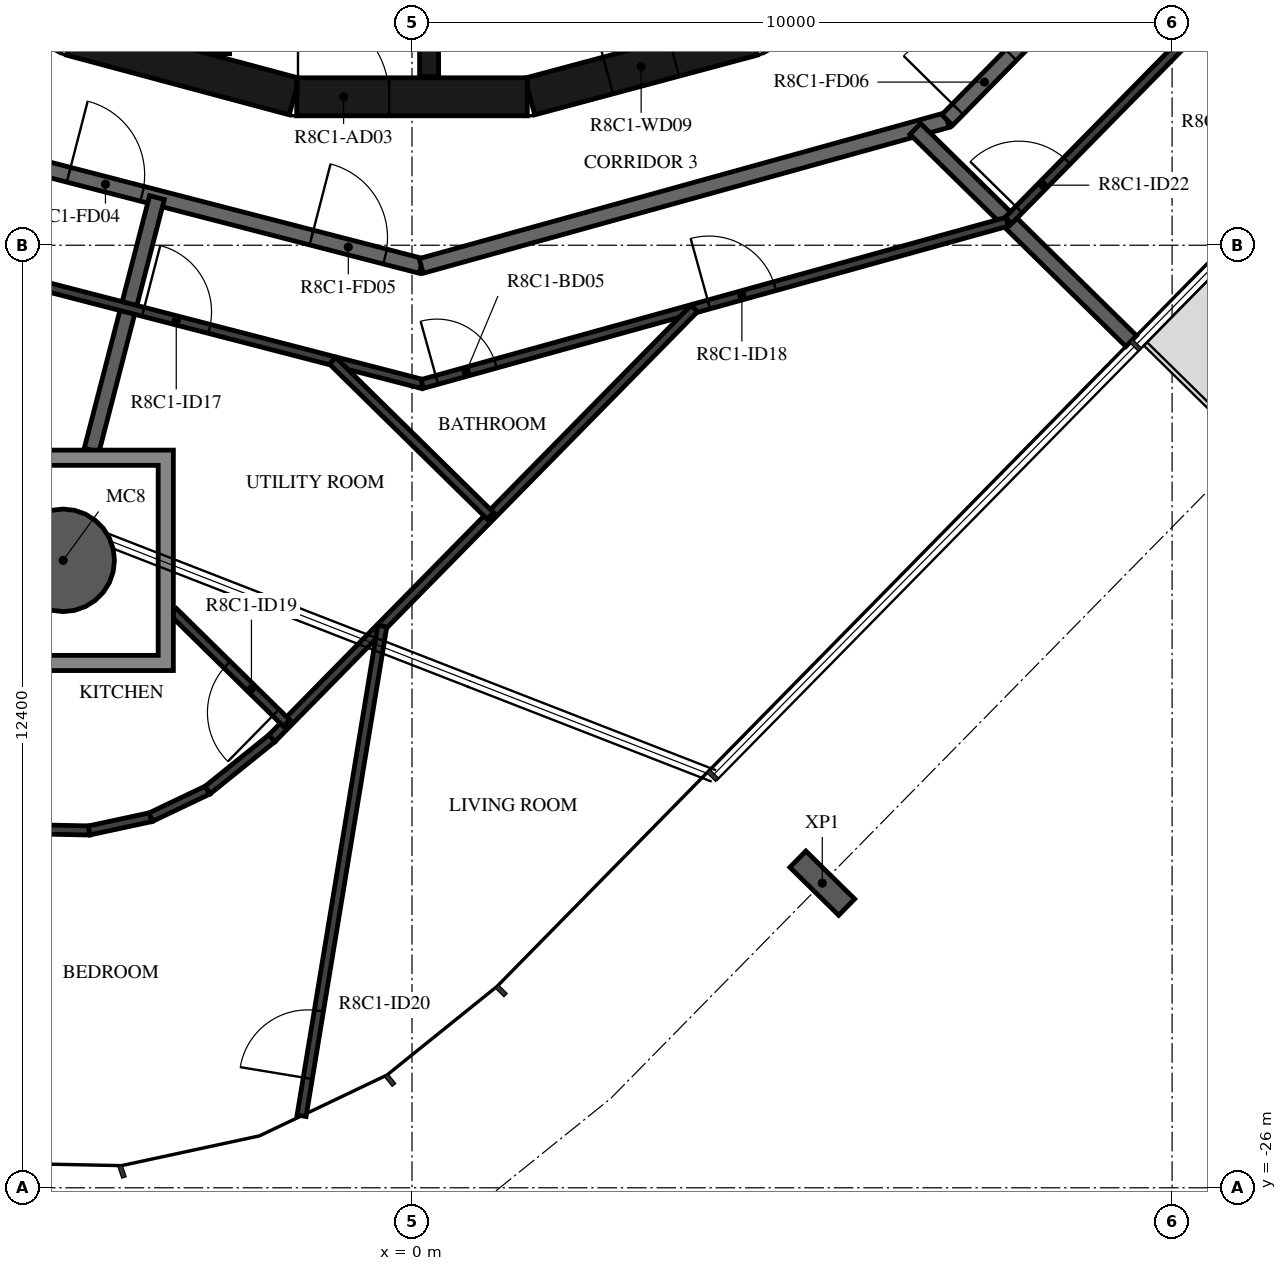
"""IFC4 building model, lengths in metres.
Left out: names, types, materials, properties, quantities, classifications, styles, units other than length and angle.
Written with IfcOpenShell. Run it as: python <this file> out.ifc"""

import sys

from ifc_helpers import new_model, si_unit, direction, frame, frame_2d, origin, origin_2d, place, context, subcontext, project, spatial, polyline, rectangle, hollow_circle, i_section, outline, extrude, element, fill, save


model = new_model("IFC4")
c1 = context("Model", 3, precision=1e-05, world=origin(), true_north=direction((0.0, 1.0)))
c2 = subcontext(c1, "Body", "Model", "MODEL_VIEW")
j1 = project(units=[si_unit("LENGTHUNIT", "METRE"), si_unit("PLANEANGLEUNIT", "RADIAN")], contexts=[c1])
p1 = place(None, origin())
s1 = spatial("IfcSite", under=j1, at=p1, CompositionType="ELEMENT")
p2 = place(p1, origin())
s2 = spatial("IfcBuilding", under=s1, at=p2, CompositionType="ELEMENT")
p3 = place(p2, frame((0.0, 0.0, 322.7)))
s3 = spatial("IfcBuildingStorey", under=s2, at=p3, CompositionType="ELEMENT", Elevation=322.7)
p4 = place(p3, frame((-4.589, -17.745, -0.38), z_axis=(0.0, 0.0, 1.0), x_axis=(1.0, 0.0, 0.0)))
e1 = element("IfcColumn", 1, at=p4, inside=s3, PredefinedType="COLUMN", context=c2, shape_type="SweptSolid", body=[
    extrude(hollow_circle(Radius=0.675, WallThickness=0.03, at=origin_2d()), origin(), (0.0, 0.0, 1.0), 2.616),
])
p5 = place(p3, frame((5.398, -21.992, -0.38), z_axis=(0.0, 0.0, 1.0), x_axis=(-0.70090935439, -0.713250360623, 0.0)))
e2 = element("IfcColumn", 2, at=p5, inside=s3, PredefinedType="COLUMN", context=c2, shape_type="SweptSolid", body=[
    extrude(i_section(OverallWidth=0.3, OverallDepth=0.9, WebThickness=0.019, FlangeThickness=0.035, FilletRadius=0.03, at=origin_2d()), origin(), (0.0, 0.0, 1.0), 2.616),
])
p6 = place(p3, frame((1.55, -11.643, 0.0), z_axis=(0.0, 0.0, 1.0), x_axis=(0.965948410781, 0.258734743916, 0.0)))
e3 = element("IfcWall", 3, at=p6, inside=s3, PredefinedType="SHEAR", context=c2, shape_type="SweptSolid", body=[
    extrude(rectangle(XDim=3.033, YDim=0.5, at=frame_2d((1.516, 0.0))), origin(), (0.0, 0.0, 1.0), 3.05),
])
p7 = place(p6, frame((1.066, 0.0, 0.0)))
e4 = element("IfcOpeningElement", 4, at=p7, cuts=e3, PredefinedType="OPENING", context=c2, shape_type="SweptSolid", body=[
    extrude(rectangle(XDim=0.9, YDim=2.1, at=frame_2d((0.45, 1.05))), frame((0.0, 0.26, 0.0), z_axis=(0.0, -1.0, 0.0), x_axis=(1.0, 0.0, 0.0)), (0.0, 0.0, 1.0), 0.52),
])
p8 = place(p3, frame((-4.479, -10.858, 0.0), z_axis=(0.0, 0.0, 1.0), x_axis=(0.965948410781, -0.258734743916, 0.0)))
e5 = element("IfcWall", 5, at=p8, inside=s3, PredefinedType="SHEAR", context=c2, shape_type="SweptSolid", body=[
    extrude(rectangle(XDim=3.033, YDim=0.5, at=frame_2d((1.516, 0.0))), origin(), (0.0, 0.0, 1.0), 3.05),
])
p9 = place(p3, frame((-1.516, -11.647, 0.0), z_axis=(0.0, 0.0, 1.0), x_axis=(1.0, 0.0, 0.0)))
e6 = element("IfcWall", 6, at=p9, inside=s3, PredefinedType="SHEAR", context=c2, shape_type="SweptSolid", body=[
    extrude(rectangle(XDim=3.033, YDim=0.5, at=frame_2d((1.516, 0.0))), origin(), (0.0, 0.0, 1.0), 3.05),
])
p10 = place(p9, frame((0.016, 0.0, 0.0)))
e7 = element("IfcOpeningElement", 7, at=p10, cuts=e6, PredefinedType="OPENING", context=c2, shape_type="SweptSolid", body=[
    extrude(rectangle(XDim=1.2, YDim=2.1, at=frame_2d((0.6, 1.05))), frame((0.0, 0.26, 0.0), z_axis=(0.0, -1.0, 0.0), x_axis=(1.0, 0.0, 0.0)), (0.0, 0.0, 1.0), 0.52),
])
p11 = place(p3, frame((-2.525, -8.97, 0.0), z_axis=(0.0, 0.0, 1.0), x_axis=(0.0, -1.0, 0.0)))
e8 = element("IfcWall", 8, at=p11, inside=s3, PredefinedType="SHEAR", context=c2, shape_type="SweptSolid", body=[
    extrude(rectangle(XDim=2.11, YDim=0.25, at=frame_2d((1.055, 0.0))), origin(), (0.0, 0.0, 1.0), 3.05),
])
p12 = place(p3, frame((0.225, -8.97, 0.0), z_axis=(0.0, 0.0, 1.0), x_axis=(0.0, -1.0, 0.0)))
e9 = element("IfcWall", 9, at=p12, inside=s3, PredefinedType="SHEAR", context=c2, shape_type="SweptSolid", body=[
    extrude(rectangle(XDim=2.41, YDim=0.25, at=frame_2d((1.205, 0.0))), origin(), (0.0, 0.0, 1.0), 3.05),
])
p13 = place(p3, frame((-6.831, -12.074, 0.0), z_axis=(0.0, 0.0, 1.0), x_axis=(0.968144780225, -0.250391063186, 0.0)))
e10 = element("IfcWall", 10, at=p13, inside=s3, PredefinedType="STANDARD", context=c2, shape_type="SweptSolid", body=[
    extrude(rectangle(XDim=7.181, YDim=0.2, at=frame_2d((3.591, 0.0))), origin(), (0.0, 0.0, 1.0), 3.05),
])
p14 = place(p13, frame((2.39, 0.0, 0.0)))
e11 = element("IfcOpeningElement", 11, at=p14, cuts=e10, PredefinedType="OPENING", context=c2, shape_type="SweptSolid", body=[
    extrude(rectangle(XDim=1.0, YDim=2.1, at=frame_2d((0.5, 1.05))), frame((0.0, 0.11, 0.0), z_axis=(0.0, -1.0, 0.0), x_axis=(1.0, 0.0, 0.0)), (0.0, 0.0, 1.0), 0.22),
])
p15 = place(p13, frame((5.69, 0.0, 0.0)))
e12 = element("IfcOpeningElement", 12, at=p15, cuts=e10, PredefinedType="OPENING", context=c2, shape_type="SweptSolid", body=[
    extrude(rectangle(XDim=1.0, YDim=2.1, at=frame_2d((0.5, 1.05))), frame((0.0, 0.11, 0.0), z_axis=(0.0, -1.0, 0.0), x_axis=(1.0, 0.0, 0.0)), (0.0, 0.0, 1.0), 0.22),
])
p16 = place(p3, frame((0.121, -13.872, 0.0), z_axis=(0.0, 0.0, 1.0), x_axis=(0.963625960674, 0.267254575108, 0.0)))
e13 = element("IfcWall", 13, at=p16, inside=s3, PredefinedType="STANDARD", context=c2, shape_type="SweptSolid", body=[
    extrude(rectangle(XDim=7.181, YDim=0.2, at=frame_2d((3.591, 0.0))), origin(), (0.0, 0.0, 1.0), 3.05),
])
p17 = place(p3, frame((7.041, -11.953, 0.0), z_axis=(0.0, 0.0, 1.0), x_axis=(0.70090916255, 0.713250549143, 0.0)))
e14 = element("IfcWall", 14, at=p17, inside=s3, PredefinedType="STANDARD", context=c2, shape_type="SweptSolid", body=[
    extrude(rectangle(XDim=7.181, YDim=0.2, at=frame_2d((3.59, 0.0))), origin(), (0.0, 0.0, 1.0), 3.05),
])
p18 = place(p17, frame((0.2, 0.0, 0.0)))
e15 = element("IfcOpeningElement", 15, at=p18, cuts=e14, PredefinedType="OPENING", context=c2, shape_type="SweptSolid", body=[
    extrude(rectangle(XDim=1.0, YDim=2.1, at=frame_2d((0.5, 1.05))), frame((0.0, 0.11, 0.0), z_axis=(0.0, -1.0, 0.0), x_axis=(1.0, 0.0, 0.0)), (0.0, 0.0, 1.0), 0.22),
])
p19 = place(p3, frame((-4.214, -16.295, 0.0), z_axis=(0.0, 0.0, 1.0), x_axis=(0.250428810918, 0.968135016752, 0.0)))
e16 = element("IfcWall", 16, at=p19, inside=s3, PredefinedType="STANDARD", context=c2, shape_type="SweptSolid", body=[
    extrude(rectangle(XDim=3.432, YDim=0.2, at=frame_2d((1.716, 0.0))), origin(), (0.0, 0.0, 1.0), 3.05),
])
p20 = place(p3, frame((9.462, -14.861, 0.0), z_axis=(0.0, 0.0, 1.0), x_axis=(-0.713302018318, 0.700856783276, 0.0)))
e17 = element("IfcWall", 17, at=p20, inside=s3, PredefinedType="STANDARD", context=c2, shape_type="SweptSolid", body=[
    extrude(rectangle(XDim=3.982, YDim=0.2, at=frame_2d((1.991, 0.0))), origin(), (0.0, 0.0, 1.0), 3.05),
])
p21 = place(p3, frame((-7.05, -13.567, 0.0), z_axis=(0.0, 0.0, 1.0), x_axis=(0.968142373865, -0.250400367264, 0.0)))
e18 = element("IfcWall", 18, at=p21, inside=s3, PredefinedType="PARTITIONING", context=c2, shape_type="SweptSolid", body=[
    extrude(rectangle(XDim=7.421, YDim=0.12, at=frame_2d((3.71, 0.0))), origin(), (0.0, 0.0, 1.0), 3.05),
])
p22 = place(p21, frame((3.628, 0.0, 0.0)))
e19 = element("IfcOpeningElement", 19, at=p22, cuts=e18, PredefinedType="OPENING", context=c2, shape_type="SweptSolid", body=[
    extrude(rectangle(XDim=0.9, YDim=2.1, at=frame_2d((0.45, 1.05))), frame((0.0, 0.07, 0.0), z_axis=(0.0, -1.0, 0.0), x_axis=(1.0, 0.0, 0.0)), (0.0, 0.0, 1.0), 0.14),
])
p23 = place(p3, frame((0.135, -15.425, 0.0), z_axis=(0.0, 0.0, 1.0), x_axis=(0.963633899075, 0.267225950373, 0.0)))
e20 = element("IfcWall", 20, at=p23, inside=s3, PredefinedType="PARTITIONING", context=c2, shape_type="SweptSolid", body=[
    extrude(rectangle(XDim=7.985, YDim=0.12, at=frame_2d((3.992, 0.0))), origin(), (0.0, 0.0, 1.0), 3.05),
])
p24 = place(p23, frame((0.2, 0.0, 0.0)))
e21 = element("IfcOpeningElement", 21, at=p24, cuts=e20, PredefinedType="OPENING", context=c2, shape_type="SweptSolid", body=[
    extrude(rectangle(XDim=0.8, YDim=2.1, at=frame_2d((0.4, 1.05))), frame((0.0, 0.07, 0.0), z_axis=(0.0, -1.0, 0.0), x_axis=(1.0, 0.0, 0.0)), (0.0, 0.0, 1.0), 0.14),
])
p25 = place(p23, frame((3.914, 0.0, 0.0)))
e22 = element("IfcOpeningElement", 22, at=p25, cuts=e20, PredefinedType="OPENING", context=c2, shape_type="SweptSolid", body=[
    extrude(rectangle(XDim=0.9, YDim=2.1, at=frame_2d((0.45, 1.05))), frame((0.0, 0.07, 0.0), z_axis=(0.0, -1.0, 0.0), x_axis=(1.0, 0.0, 0.0)), (0.0, 0.0, 1.0), 0.14),
])
for number, where, z_axis, x_axis in (
    (23, (-5.076, -21.282, 0.0), (0.0, 0.0, 1.0), (1.0, -0.02, 0.0)),
    (24, (-4.247, -21.299, 0.0), (0.0, 0.0, 1.0), (0.978, 0.211, 0.0)),
):
    element("IfcWall", number, at=place(p3, frame(where, z_axis=z_axis, x_axis=x_axis)), inside=s3, PredefinedType="PARTITIONING", context=c2, shape_type="SweptSolid", body=[
        extrude(rectangle(XDim=0.829, YDim=0.12, at=frame_2d((0.415, 0.0))), origin(), (0.0, 0.0, 1.0), 3.05),
    ])
p26 = place(p3, frame((-3.437, -21.124, 0.0), z_axis=(0.0, 0.0, 1.0), x_axis=(0.902637137035, 0.430402368541, 0.0)))
e25 = element("IfcWall", 25, at=p26, inside=s3, PredefinedType="PARTITIONING", context=c2, shape_type="SweptSolid", body=[
    extrude(rectangle(XDim=0.829, YDim=0.12, at=frame_2d((0.414, 0.0))), origin(), (0.0, 0.0, 1.0), 3.05),
])
p27 = place(p3, frame((-2.689, -20.768, 0.0), z_axis=(0.0, 0.0, 1.0), x_axis=(0.778936756675, 0.627102486919, 0.0)))
e26 = element("IfcWall", 26, at=p27, inside=s3, PredefinedType="PARTITIONING", context=c2, shape_type="SweptSolid", body=[
    extrude(rectangle(XDim=1.087, YDim=0.12, at=frame_2d((0.543, 0.0))), origin(), (0.0, 0.0, 1.0), 3.05),
])
p28 = place(p3, frame((-1.842, -20.086, 0.0), z_axis=(0.0, 0.0, 1.0), x_axis=(0.700919640212, 0.713240252625, 0.0)))
e27 = element("IfcWall", 27, at=p28, inside=s3, PredefinedType="PARTITIONING", context=c2, shape_type="SweptSolid", body=[
    extrude(rectangle(XDim=7.926, YDim=0.12, at=frame_2d((3.963, 0.0))), origin(), (0.0, 0.0, 1.0), 3.05),
])
p29 = place(p3, frame((-1.649, -19.889, 0.0), z_axis=(0.0, 0.0, 1.0), x_axis=(-0.713270858454, 0.700888495041, 0.0)))
e28 = element("IfcWall", 28, at=p29, inside=s3, PredefinedType="PARTITIONING", context=c2, shape_type="SweptSolid", body=[
    extrude(rectangle(XDim=2.09, YDim=0.12, at=frame_2d((1.045, 0.0))), origin(), (0.0, 0.0, 1.0), 3.05),
])
p30 = place(p29, frame((0.2, 0.0, 0.0)))
e29 = element("IfcOpeningElement", 29, at=p30, cuts=e28, PredefinedType="OPENING", context=c2, shape_type="SweptSolid", body=[
    extrude(rectangle(XDim=0.9, YDim=2.1, at=frame_2d((0.45, 1.05))), frame((0.0, 0.07, 0.0), z_axis=(0.0, -1.0, 0.0), x_axis=(1.0, 0.0, 0.0)), (0.0, 0.0, 1.0), 0.14),
])
p31 = place(p3, frame((-1.453, -25.053, 0.0), z_axis=(0.0, 0.0, 1.0), x_axis=(0.162683241952, 0.986678348191, 0.0)))
e30 = element("IfcWall", 30, at=p31, inside=s3, PredefinedType="PARTITIONING", context=c2, shape_type="SweptSolid", body=[
    extrude(rectangle(XDim=6.531, YDim=0.12, at=frame_2d((3.266, 0.0))), origin(), (0.0, 0.0, 1.0), 3.05),
])
p32 = place(p31, frame((0.5, 0.0, 0.0)))
e31 = element("IfcOpeningElement", 31, at=p32, cuts=e30, PredefinedType="OPENING", context=c2, shape_type="SweptSolid", body=[
    extrude(rectangle(XDim=0.9, YDim=2.1, at=frame_2d((0.45, 1.05))), frame((0.0, 0.07, 0.0), z_axis=(0.0, -1.0, 0.0), x_axis=(1.0, 0.0, 0.0)), (0.0, 0.0, 1.0), 0.14),
])
p33 = place(p3, frame((1.032, -17.161, 0.0), z_axis=(0.0, 0.0, 1.0), x_axis=(-0.713201827259, 0.700958738867, 0.0)))
e32 = element("IfcWall", 32, at=p33, inside=s3, PredefinedType="PARTITIONING", context=c2, shape_type="SweptSolid", body=[
    extrude(rectangle(XDim=2.911, YDim=0.12, at=frame_2d((1.456, 0.0))), origin(), (0.0, 0.0, 1.0), 3.05),
])
p34 = place(p3, frame((7.846, -13.273, 0.0), z_axis=(0.0, 0.0, 1.0), x_axis=(0.700911018066, 0.713248725728, 0.0)))
e33 = element("IfcWall", 33, at=p34, inside=s3, PredefinedType="PARTITIONING", context=c2, shape_type="SweptSolid", body=[
    extrude(rectangle(XDim=7.935, YDim=0.12, at=frame_2d((3.968, 0.0))), origin(), (0.0, 0.0, 1.0), 3.05),
])
p35 = place(p34, frame((0.2, 0.0, 0.0)))
e34 = element("IfcOpeningElement", 34, at=p35, cuts=e33, PredefinedType="OPENING", context=c2, shape_type="SweptSolid", body=[
    extrude(rectangle(XDim=0.9, YDim=2.1, at=frame_2d((0.45, 1.05))), frame((0.0, 0.07, 0.0), z_axis=(0.0, -1.0, 0.0), x_axis=(1.0, 0.0, 0.0)), (0.0, 0.0, 1.0), 0.14),
])
p36 = place(p3, origin())
e35 = element("IfcWall", 35, at=p36, inside=s3, PredefinedType="STANDARD", context=c2, shape_type="SweptSolid", body=[
    extrude(outline(polyline([(-3.139, -16.295), (-3.139, -19.195), (-6.039, -19.195), (-6.039, -16.295), (-3.139, -16.295)]), holes=[polyline([(-5.839, -18.995), (-3.339, -18.995), (-3.339, -16.495), (-5.839, -16.495), (-5.839, -18.995)])]), origin(), (0.0, 0.0, 1.0), 3.05),
])
p37 = place(p10, origin())
e36 = element("IfcDoor", 36, at=p37, inside=s3, OperationType="SINGLE_SWING_RIGHT", PredefinedType="DOOR", context=c2, shape_type="SweptSolid", body=[
    extrude(rectangle(XDim=1.2, YDim=2.1, at=frame_2d((0.6, 1.05))), frame((0.0, 0.025, 0.0), z_axis=(0.0, -1.0, 0.0), x_axis=(1.0, 0.0, 0.0)), (0.0, 0.0, 1.0), 0.05),
])
fill(e7, e36)
p38 = place(p7, origin())
e37 = element("IfcDoor", 37, at=p38, inside=s3, OperationType="SINGLE_SWING_LEFT", PredefinedType="DOOR", context=c2, shape_type="SweptSolid", body=[
    extrude(rectangle(XDim=0.9, YDim=2.1, at=frame_2d((0.45, 1.05))), frame((0.0, 0.025, 0.0), z_axis=(0.0, -1.0, 0.0), x_axis=(1.0, 0.0, 0.0)), (0.0, 0.0, 1.0), 0.05),
])
fill(e4, e37)
p39 = place(p14, origin())
e38 = element("IfcDoor", 38, at=p39, inside=s3, OperationType="SINGLE_SWING_RIGHT", PredefinedType="DOOR", context=c2, shape_type="SweptSolid", body=[
    extrude(rectangle(XDim=1.0, YDim=2.1, at=frame_2d((0.5, 1.05))), frame((0.0, 0.025, 0.0), z_axis=(0.0, -1.0, 0.0), x_axis=(1.0, 0.0, 0.0)), (0.0, 0.0, 1.0), 0.05),
])
fill(e11, e38)
p40 = place(p15, origin())
e39 = element("IfcDoor", 39, at=p40, inside=s3, OperationType="SINGLE_SWING_LEFT", PredefinedType="DOOR", context=c2, shape_type="SweptSolid", body=[
    extrude(rectangle(XDim=1.0, YDim=2.1, at=frame_2d((0.5, 1.05))), frame((0.0, 0.025, 0.0), z_axis=(0.0, -1.0, 0.0), x_axis=(1.0, 0.0, 0.0)), (0.0, 0.0, 1.0), 0.05),
])
fill(e12, e39)
p41 = place(p22, origin())
e40 = element("IfcDoor", 40, at=p41, inside=s3, OperationType="SINGLE_SWING_RIGHT", PredefinedType="DOOR", context=c2, shape_type="SweptSolid", body=[
    extrude(rectangle(XDim=0.9, YDim=2.1, at=frame_2d((0.45, 1.05))), frame((0.0, 0.025, 0.0), z_axis=(0.0, -1.0, 0.0), x_axis=(1.0, 0.0, 0.0)), (0.0, 0.0, 1.0), 0.05),
])
fill(e19, e40)
p42 = place(p24, origin())
e41 = element("IfcDoor", 41, at=p42, inside=s3, OperationType="SINGLE_SWING_LEFT", PredefinedType="DOOR", context=c2, shape_type="SweptSolid", body=[
    extrude(rectangle(XDim=0.8, YDim=2.1, at=frame_2d((0.4, 1.05))), frame((0.0, 0.025, 0.0), z_axis=(0.0, -1.0, 0.0), x_axis=(1.0, 0.0, 0.0)), (0.0, 0.0, 1.0), 0.05),
])
fill(e21, e41)
p43 = place(p25, origin())
e42 = element("IfcDoor", 42, at=p43, inside=s3, OperationType="SINGLE_SWING_LEFT", PredefinedType="DOOR", context=c2, shape_type="SweptSolid", body=[
    extrude(rectangle(XDim=0.9, YDim=2.1, at=frame_2d((0.45, 1.05))), frame((0.0, 0.025, 0.0), z_axis=(0.0, -1.0, 0.0), x_axis=(1.0, 0.0, 0.0)), (0.0, 0.0, 1.0), 0.05),
])
fill(e22, e42)
p44 = place(p30, origin())
e43 = element("IfcDoor", 43, at=p44, inside=s3, OperationType="SINGLE_SWING_LEFT", PredefinedType="DOOR", context=c2, shape_type="SweptSolid", body=[
    extrude(rectangle(XDim=0.9, YDim=2.1, at=frame_2d((0.45, 1.05))), frame((0.0, 0.025, 0.0), z_axis=(0.0, -1.0, 0.0), x_axis=(1.0, 0.0, 0.0)), (0.0, 0.0, 1.0), 0.05),
])
fill(e29, e43)
p45 = place(p32, origin())
e44 = element("IfcDoor", 44, at=p45, inside=s3, OperationType="SINGLE_SWING_LEFT", PredefinedType="DOOR", context=c2, shape_type="SweptSolid", body=[
    extrude(rectangle(XDim=0.9, YDim=2.1, at=frame_2d((0.45, 1.05))), frame((0.0, 0.025, 0.0), z_axis=(0.0, -1.0, 0.0), x_axis=(1.0, 0.0, 0.0)), (0.0, 0.0, 1.0), 0.05),
])
fill(e31, e44)
p46 = place(p18, origin())
e45 = element("IfcDoor", 45, at=p46, inside=s3, OperationType="SINGLE_SWING_LEFT", PredefinedType="DOOR", context=c2, shape_type="SweptSolid", body=[
    extrude(rectangle(XDim=1.0, YDim=2.1, at=frame_2d((0.5, 1.05))), frame((0.0, 0.025, 0.0), z_axis=(0.0, -1.0, 0.0), x_axis=(1.0, 0.0, 0.0)), (0.0, 0.0, 1.0), 0.05),
])
fill(e15, e45)
p47 = place(p35, origin())
e46 = element("IfcDoor", 46, at=p47, inside=s3, OperationType="SINGLE_SWING_LEFT", PredefinedType="DOOR", context=c2, shape_type="SweptSolid", body=[
    extrude(rectangle(XDim=0.9, YDim=2.1, at=frame_2d((0.45, 1.05))), frame((0.0, 0.025, 0.0), z_axis=(0.0, -1.0, 0.0), x_axis=(1.0, 0.0, 0.0)), (0.0, 0.0, 1.0), 0.05),
])
fill(e34, e46)
save(model, sys.argv[1])
